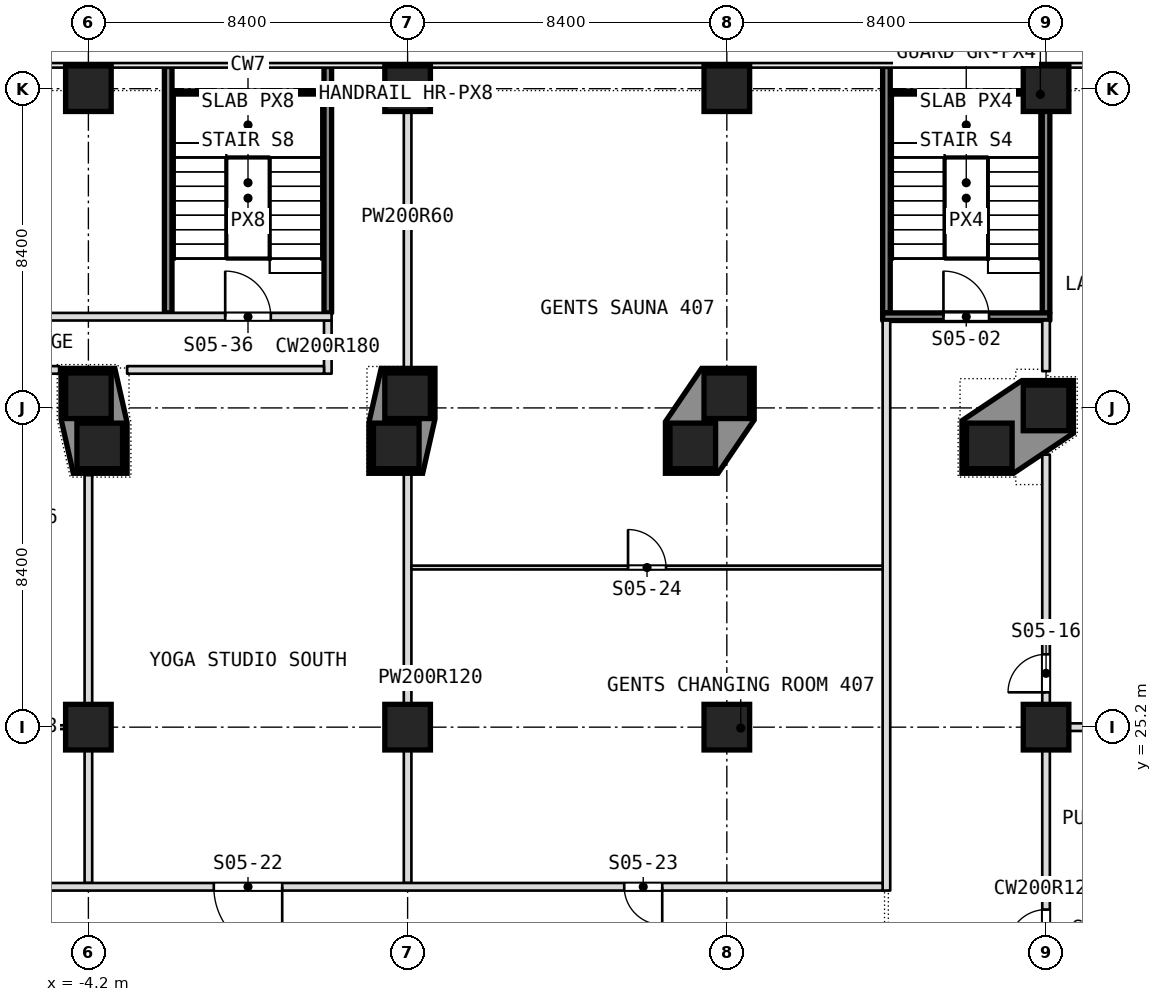
"""IFC4 building model, lengths in metres.
Left out: names, types, materials, properties, quantities, classifications, styles, units other than length and angle.
Written with IfcOpenShell. Run it as: python <this file> out.ifc"""

import sys

from ifc_helpers import new_model, si_unit, direction, frame, frame_2d, origin, origin_2d, place, context, subcontext, project, spatial, polyline, rectangle, outline, extrude, element, fill, save


model = new_model("IFC4")
c1 = context("Model", 3, precision=1e-05, world=origin(), true_north=direction((0.0, 1.0)))
c2 = subcontext(c1, "Body", "Model", "MODEL_VIEW")
j1 = project(units=[si_unit("LENGTHUNIT", "METRE"), si_unit("PLANEANGLEUNIT", "RADIAN")], contexts=[c1])
p1 = place(None, origin())
s1 = spatial("IfcSite", under=j1, at=p1, CompositionType="ELEMENT")
p2 = place(p1, origin())
s2 = spatial("IfcBuilding", under=s1, at=p2, CompositionType="ELEMENT")
p3 = place(p2, frame((0.0, 0.0, 26.0)))
s3 = spatial("IfcBuildingStorey", under=s2, at=p3, CompositionType="ELEMENT", Elevation=26.0)
for number, where, z_axis, x_axis in (
    (1, (-4.2, 25.2, 0.0), (0.0, 0.0, 1.0), (1.0, 0.0, 0.0)),
    (2, (4.2, 25.2, 0.0), (0.0, 0.0, 1.0), (1.0, 0.0, 0.0)),
    (3, (12.6, 25.2, 0.0), (0.0, 0.0, 1.0), (1.0, 0.0, 0.0)),
    (4, (21.0, 25.2, 0.0), (0.0, 0.0, 1.0), (1.0, 0.0, 0.0)),
    (5, (-4.2, 33.92, 0.0), (0.0, 0.0, 1.0), (1.0, 0.0, 0.0)),
    (6, (4.2, 33.92, 0.0), (0.0, 0.0, 1.0), (1.0, 0.0, 0.0)),
    (7, (12.6, 33.92, 0.0), (0.0, 0.0, 1.0), (1.0, 0.0, 0.0)),
    (8, (21.0, 33.6, 0.0), (0.0, 0.0, 1.0), (1.0, 0.0, 0.0)),
    (9, (-4.2, 42.0, 0.0), (0.0, 0.0, 1.0), (1.0, 0.0, 0.0)),
    (10, (4.2, 42.0, 0.0), (0.0, 0.0, 1.0), (1.0, 0.0, 0.0)),
    (11, (12.6, 42.0, 0.0), (0.0, 0.0, 1.0), (1.0, 0.0, 0.0)),
    (12, (21.0, 42.0, 0.0), (0.0, 0.0, 1.0), (1.0, 0.0, 0.0)),
    (13, (-3.901, 32.6, 0.0), (0.0, 0.0, 1.0), (1.0, 0.0, 0.0)),
    (14, (3.901, 32.6, 0.0), (0.0, 0.0, 1.0), (1.0, 0.0, 0.0)),
    (15, (11.704, 32.6, 0.0), (0.0, 0.0, 1.0), (1.0, 0.0, 0.0)),
    (16, (19.507, 32.6, 0.0), (0.0, 0.0, 1.0), (1.0, 0.0, 0.0)),
):
    element("IfcColumn", number, at=place(p3, frame(where, z_axis=z_axis, x_axis=x_axis)), inside=s3, PredefinedType="COLUMN", context=c2, shape_type="SweptSolid", body=[
        extrude(rectangle(XDim=1.2, YDim=1.2, at=origin_2d()), origin(), (0.0, 0.0, 1.0), 5.0),
    ])
p4 = place(p3, frame((21.0, 9.5, 0.0), z_axis=(0.0, 0.0, 1.0), x_axis=(0.0, 1.0, 0.0)))
e17 = element("IfcWall", 17, at=p4, inside=s3, PredefinedType="PARTITIONING", context=c2, shape_type="SweptSolid", body=[
    extrude(rectangle(XDim=22.871, YDim=0.2, at=frame_2d((11.436, 0.0))), origin(), (0.0, 0.0, 1.0), 4.68),
])
p5 = place(p4, frame((9.9, 0.0, 0.0)))
e18 = element("IfcOpeningElement", 18, at=p5, cuts=e17, PredefinedType="OPENING", context=c2, shape_type="SweptSolid", body=[
    extrude(rectangle(XDim=1.0, YDim=2.1, at=frame_2d((0.5, 1.05))), frame((0.0, 0.1, 0.0), z_axis=(0.0, -1.0, 0.0), x_axis=(1.0, 0.0, 0.0)), (0.0, 0.0, 1.0), 0.2),
])
p6 = place(p4, frame((16.617, 0.0, 0.0)))
e19 = element("IfcOpeningElement", 19, at=p6, cuts=e17, PredefinedType="OPENING", context=c2, shape_type="SweptSolid", body=[
    extrude(rectangle(XDim=1.0, YDim=2.1, at=frame_2d((0.5, 1.05))), frame((0.0, 0.1, 0.0), z_axis=(0.0, -1.0, 0.0), x_axis=(1.0, 0.0, 0.0)), (0.0, 0.0, 1.0), 0.2),
])
p7 = place(p3, frame((21.0, 34.567, 0.0), z_axis=(0.0, 0.0, 1.0), x_axis=(0.0, 1.0, 0.0)))
e20 = element("IfcWall", 20, at=p7, inside=s3, PredefinedType="PARTITIONING", context=c2, shape_type="SweptSolid", body=[
    extrude(rectangle(XDim=1.333, YDim=0.2, at=frame_2d((0.667, 0.0))), origin(), (0.0, 0.0, 1.0), 4.68),
])
p8 = place(p3, frame((21.0, 36.1, 0.0), z_axis=(0.0, 0.0, 1.0), x_axis=(0.0, 1.0, 0.0)))
e21 = element("IfcWall", 21, at=p8, inside=s3, PredefinedType="PARTITIONING", context=c2, shape_type="SweptSolid", body=[
    extrude(rectangle(XDim=6.484, YDim=0.2, at=frame_2d((3.242, 0.0))), origin(), (0.0, 0.0, 1.0), 4.68),
])
p9 = place(p3, frame((16.8, 20.9, 0.0), z_axis=(0.0, 0.0, 1.0), x_axis=(0.0, 1.0, 0.0)))
e22 = element("IfcWall", 22, at=p9, inside=s3, PredefinedType="PARTITIONING", context=c2, shape_type="SweptSolid", body=[
    extrude(rectangle(XDim=15.0, YDim=0.2, at=frame_2d((7.5, 0.0))), origin(), (0.0, 0.0, 1.0), 4.68),
])
p10 = place(p3, frame((16.8, 36.1, 0.0), z_axis=(0.0, 0.0, 1.0), x_axis=(0.0, 1.0, 0.0)))
e23 = element("IfcWall", 23, at=p10, inside=s3, PredefinedType="PARTITIONING", context=c2, shape_type="SweptSolid", body=[
    extrude(rectangle(XDim=6.484, YDim=0.2, at=frame_2d((3.242, 0.0))), origin(), (0.0, 0.0, 1.0), 4.68),
])
p11 = place(p3, frame((4.2, 21.1, 0.0), z_axis=(0.0, 0.0, 1.0), x_axis=(0.0, 1.0, 0.0)))
e24 = element("IfcWall", 24, at=p11, inside=s3, PredefinedType="PARTITIONING", context=c2, shape_type="SweptSolid", body=[
    extrude(rectangle(XDim=10.78, YDim=0.2, at=frame_2d((5.39, 0.0))), origin(), (0.0, 0.0, 1.0), 4.68),
])
p12 = place(p3, frame((4.2, 34.64, 0.0), z_axis=(0.0, 0.0, 1.0), x_axis=(0.0, 1.0, 0.0)))
e25 = element("IfcWall", 25, at=p12, inside=s3, PredefinedType="PARTITIONING", context=c2, shape_type="SweptSolid", body=[
    extrude(rectangle(XDim=7.944, YDim=0.2, at=frame_2d((3.972, 0.0))), origin(), (0.0, 0.0, 1.0), 4.68),
])
p13 = place(p3, frame((2.1, 36.1, 0.0), z_axis=(0.0, 0.0, 1.0), x_axis=(0.0, 1.0, 0.0)))
e26 = element("IfcWall", 26, at=p13, inside=s3, PredefinedType="PARTITIONING", context=c2, shape_type="SweptSolid", body=[
    extrude(rectangle(XDim=6.484, YDim=0.2, at=frame_2d((3.242, 0.0))), origin(), (0.0, 0.0, 1.0), 4.68),
])
p14 = place(p3, frame((2.1, 34.5, 0.0), z_axis=(0.0, 0.0, 1.0), x_axis=(0.0, 1.0, 0.0)))
e27 = element("IfcWall", 27, at=p14, inside=s3, PredefinedType="PARTITIONING", context=c2, shape_type="SweptSolid", body=[
    extrude(rectangle(XDim=1.4, YDim=0.2, at=frame_2d((0.7, 0.0))), origin(), (0.0, 0.0, 1.0), 4.68),
])
p15 = place(p3, frame((-2.1, 36.1, 0.0), z_axis=(0.0, 0.0, 1.0), x_axis=(0.0, 1.0, 0.0)))
e28 = element("IfcWall", 28, at=p15, inside=s3, PredefinedType="PARTITIONING", context=c2, shape_type="SweptSolid", body=[
    extrude(rectangle(XDim=6.484, YDim=0.2, at=frame_2d((3.242, 0.0))), origin(), (0.0, 0.0, 1.0), 4.68),
])
p16 = place(p3, frame((-4.2, 21.1, 0.0), z_axis=(0.0, 0.0, 1.0), x_axis=(0.0, 1.0, 0.0)))
e29 = element("IfcWall", 29, at=p16, inside=s3, PredefinedType="PARTITIONING", context=c2, shape_type="SweptSolid", body=[
    extrude(rectangle(XDim=10.73, YDim=0.2, at=frame_2d((5.365, 0.0))), origin(), (0.0, 0.0, 1.0), 4.68),
])
p17 = place(p3, frame((-16.7, 21.0, 0.0), z_axis=(0.0, 0.0, 1.0), x_axis=(1.0, 0.0, 0.0)))
e30 = element("IfcWall", 30, at=p17, inside=s3, PredefinedType="PARTITIONING", context=c2, shape_type="SweptSolid", body=[
    extrude(rectangle(XDim=33.4, YDim=0.2, at=frame_2d((16.7, 0.0))), origin(), (0.0, 0.0, 1.0), 4.68),
])
p18 = place(p17, frame((15.8, 0.0, 0.0)))
e31 = element("IfcOpeningElement", 31, at=p18, cuts=e30, PredefinedType="OPENING", context=c2, shape_type="SweptSolid", body=[
    extrude(rectangle(XDim=1.8, YDim=2.1, at=frame_2d((0.9, 1.05))), frame((0.0, 0.1, 0.0), z_axis=(0.0, -1.0, 0.0), x_axis=(1.0, 0.0, 0.0)), (0.0, 0.0, 1.0), 0.2),
])
p19 = place(p17, frame((26.6, 0.0, 0.0)))
e32 = element("IfcOpeningElement", 32, at=p19, cuts=e30, PredefinedType="OPENING", context=c2, shape_type="SweptSolid", body=[
    extrude(rectangle(XDim=1.0, YDim=2.1, at=frame_2d((0.5, 1.05))), frame((0.0, 0.1, 0.0), z_axis=(0.0, -1.0, 0.0), x_axis=(1.0, 0.0, 0.0)), (0.0, 0.0, 1.0), 0.2),
])
p20 = place(p3, frame((21.1, 25.2, 0.0), z_axis=(0.0, 0.0, 1.0), x_axis=(1.0, 0.0, 0.0)))
e33 = element("IfcWall", 33, at=p20, inside=s3, PredefinedType="PARTITIONING", context=c2, shape_type="SweptSolid", body=[
    extrude(rectangle(XDim=6.765, YDim=0.2, at=frame_2d((3.382, 0.0))), origin(), (0.0, 0.0, 1.0), 4.68),
])
p21 = place(p3, frame((-11.98, 25.2, 0.0), z_axis=(0.0, 0.0, 1.0), x_axis=(1.0, 0.0, 0.0)))
e34 = element("IfcWall", 34, at=p21, inside=s3, PredefinedType="PARTITIONING", context=c2, shape_type="SweptSolid", body=[
    extrude(rectangle(XDim=7.68, YDim=0.1, at=frame_2d((3.84, 0.0))), origin(), (0.0, 0.0, 1.0), 4.68),
])
p22 = place(p21, frame((2.94, 0.0, 0.0)))
e35 = element("IfcOpeningElement", 35, at=p22, cuts=e34, PredefinedType="OPENING", context=c2, shape_type="SweptSolid", body=[
    extrude(rectangle(XDim=1.8, YDim=2.1, at=frame_2d((0.9, 1.05))), frame((0.0, 0.05, 0.0), z_axis=(0.0, -1.0, 0.0), x_axis=(1.0, 0.0, 0.0)), (0.0, 0.0, 1.0), 0.1),
])
p23 = place(p3, frame((4.3, 29.4, 0.0), z_axis=(0.0, 0.0, 1.0), x_axis=(1.0, 0.0, 0.0)))
e36 = element("IfcWall", 36, at=p23, inside=s3, PredefinedType="PARTITIONING", context=c2, shape_type="SweptSolid", body=[
    extrude(rectangle(XDim=12.4, YDim=0.1, at=frame_2d((6.2, 0.0))), origin(), (0.0, 0.0, 1.0), 4.68),
])
p24 = place(p23, frame((5.7, 0.0, 0.0)))
e37 = element("IfcOpeningElement", 37, at=p24, cuts=e36, PredefinedType="OPENING", context=c2, shape_type="SweptSolid", body=[
    extrude(rectangle(XDim=1.0, YDim=2.1, at=frame_2d((0.5, 1.05))), frame((0.0, 0.05, 0.0), z_axis=(0.0, -1.0, 0.0), x_axis=(1.0, 0.0, 0.0)), (0.0, 0.0, 1.0), 0.1),
])
p25 = place(p3, frame((-10.984, 34.6, 0.0), z_axis=(0.0, 0.0, 1.0), x_axis=(1.0, 0.0, 0.0)))
e38 = element("IfcWall", 38, at=p25, inside=s3, PredefinedType="PARTITIONING", context=c2, shape_type="SweptSolid", body=[
    extrude(rectangle(XDim=6.014, YDim=0.2, at=frame_2d((3.007, 0.0))), origin(), (0.0, 0.0, 1.0), 4.68),
])
p26 = place(p3, frame((-3.181, 34.6, 0.0), z_axis=(0.0, 0.0, 1.0), x_axis=(1.0, 0.0, 0.0)))
e39 = element("IfcWall", 39, at=p26, inside=s3, PredefinedType="PARTITIONING", context=c2, shape_type="SweptSolid", body=[
    extrude(rectangle(XDim=5.181, YDim=0.2, at=frame_2d((2.59, 0.0))), origin(), (0.0, 0.0, 1.0), 4.68),
])
p27 = place(p3, frame((-21.1, 36.0, 0.0), z_axis=(0.0, 0.0, 1.0), x_axis=(1.0, 0.0, 0.0)))
e40 = element("IfcWall", 40, at=p27, inside=s3, PredefinedType="PARTITIONING", context=c2, shape_type="SweptSolid", body=[
    extrude(rectangle(XDim=23.3, YDim=0.2, at=frame_2d((11.65, 0.0))), origin(), (0.0, 0.0, 1.0), 4.68),
])
p28 = place(p27, frame((1.6, 0.0, 0.0)))
e41 = element("IfcOpeningElement", 41, at=p28, cuts=e40, PredefinedType="OPENING", context=c2, shape_type="SweptSolid", body=[
    extrude(rectangle(XDim=1.2, YDim=2.1, at=frame_2d((0.6, 1.05))), frame((0.0, 0.1, 0.0), z_axis=(0.0, -1.0, 0.0), x_axis=(1.0, 0.0, 0.0)), (0.0, 0.0, 1.0), 0.2),
])
p29 = place(p27, frame((11.15, 0.0, 0.0)))
e42 = element("IfcOpeningElement", 42, at=p29, cuts=e40, PredefinedType="OPENING", context=c2, shape_type="SweptSolid", body=[
    extrude(rectangle(XDim=1.0, YDim=2.1, at=frame_2d((0.5, 1.05))), frame((0.0, 0.1, 0.0), z_axis=(0.0, -1.0, 0.0), x_axis=(1.0, 0.0, 0.0)), (0.0, 0.0, 1.0), 0.2),
])
p30 = place(p27, frame((10.05, 0.0, 0.0)))
e43 = element("IfcOpeningElement", 43, at=p30, cuts=e40, PredefinedType="OPENING", context=c2, shape_type="SweptSolid", body=[
    extrude(rectangle(XDim=1.0, YDim=2.1, at=frame_2d((0.5, 1.05))), frame((0.0, 0.1, 0.0), z_axis=(0.0, -1.0, 0.0), x_axis=(1.0, 0.0, 0.0)), (0.0, 0.0, 1.0), 0.2),
])
p31 = place(p27, frame((20.5, 0.0, 0.0)))
e44 = element("IfcOpeningElement", 44, at=p31, cuts=e40, PredefinedType="OPENING", context=c2, shape_type="SweptSolid", body=[
    extrude(rectangle(XDim=1.2, YDim=2.1, at=frame_2d((0.6, 1.05))), frame((0.0, 0.1, 0.0), z_axis=(0.0, -1.0, 0.0), x_axis=(1.0, 0.0, 0.0)), (0.0, 0.0, 1.0), 0.2),
])
p32 = place(p3, frame((16.7, 36.0, 0.0), z_axis=(0.0, 0.0, 1.0), x_axis=(1.0, 0.0, 0.0)))
e45 = element("IfcWall", 45, at=p32, inside=s3, PredefinedType="PARTITIONING", context=c2, shape_type="SweptSolid", body=[
    extrude(rectangle(XDim=4.4, YDim=0.2, at=frame_2d((2.2, 0.0))), origin(), (0.0, 0.0, 1.0), 4.68),
])
p33 = place(p32, frame((1.6, 0.0, 0.0)))
e46 = element("IfcOpeningElement", 46, at=p33, cuts=e45, PredefinedType="OPENING", context=c2, shape_type="SweptSolid", body=[
    extrude(rectangle(XDim=1.2, YDim=2.1, at=frame_2d((0.6, 1.05))), frame((0.0, 0.1, 0.0), z_axis=(0.0, -1.0, 0.0), x_axis=(1.0, 0.0, 0.0)), (0.0, 0.0, 1.0), 0.2),
])
p34 = place(p3, origin())
e47 = element("IfcWall", 47, at=p34, inside=s3, PredefinedType="SOLIDWALL", context=c2, shape_type="SweptSolid", body=[
    extrude(outline(polyline([(-4.92, 33.307), (-4.92, 34.64), (-3.504, 34.64), (-3.181, 33.213), (-3.181, 31.88), (-4.597, 31.88), (-4.92, 33.307)]), holes=[polyline([(-4.501, 32.0), (-3.302, 32.0), (-3.302, 33.2), (-4.501, 33.2), (-4.501, 32.0)]), polyline([(-4.8, 33.32), (-3.6, 33.32), (-3.6, 34.52), (-4.8, 34.52), (-4.8, 33.32)])]), origin(), (0.0, 0.0, 1.0), 5.0),
])
p35 = place(p3, origin())
e48 = element("IfcWall", 48, at=p35, inside=s3, PredefinedType="SOLIDWALL", context=c2, shape_type="SweptSolid", body=[
    extrude(outline(polyline([(3.181, 33.213), (3.504, 34.64), (4.92, 34.64), (4.92, 33.307), (4.597, 31.88), (3.181, 31.88), (3.181, 33.213)]), holes=[polyline([(3.6, 33.32), (4.8, 33.32), (4.8, 34.52), (3.6, 34.52), (3.6, 33.32)]), polyline([(3.302, 32.0), (4.501, 32.0), (4.501, 33.2), (3.302, 33.2), (3.302, 32.0)])]), origin(), (0.0, 0.0, 1.0), 5.0),
])
p36 = place(p3, origin())
e49 = element("IfcWall", 49, at=p36, inside=s3, PredefinedType="SOLIDWALL", context=c2, shape_type="SweptSolid", body=[
    extrude(outline(polyline([(11.937, 34.64), (13.32, 34.64), (13.32, 33.283), (12.368, 31.88), (10.984, 31.88), (10.984, 33.237), (11.937, 34.64)]), holes=[polyline([(13.2, 33.32), (13.2, 34.52), (12.0, 34.52), (12.0, 33.32), (13.2, 33.32)]), polyline([(12.304, 32.0), (12.304, 33.2), (11.104, 33.2), (11.104, 32.0), (12.304, 32.0)])]), origin(), (0.0, 0.0, 1.0), 5.0),
])
p37 = place(p3, origin())
e50 = element("IfcWall", 50, at=p37, inside=s3, PredefinedType="SOLIDWALL", context=c2, shape_type="SweptSolid", body=[
    extrude(outline(polyline([(20.364, 34.32), (21.72, 34.32), (21.72, 32.936), (20.143, 31.88), (18.787, 31.88), (18.787, 33.264), (20.364, 34.32)]), holes=[polyline([(21.6, 33.0), (21.6, 34.2), (20.4, 34.2), (20.4, 33.0), (21.6, 33.0)]), polyline([(20.107, 32.0), (20.107, 33.2), (18.907, 33.2), (18.907, 32.0), (20.107, 32.0)])]), origin(), (0.0, 0.0, 1.0), 5.0),
])
p38 = place(p33, origin())
e51 = element("IfcDoor", 51, at=p38, inside=s3, OperationType="SINGLE_SWING_LEFT", PredefinedType="DOOR", context=c2, shape_type="SweptSolid", body=[
    extrude(rectangle(XDim=1.2, YDim=2.1, at=frame_2d((0.6, 1.05))), frame((0.0, 0.025, 0.0), z_axis=(0.0, -1.0, 0.0), x_axis=(1.0, 0.0, 0.0)), (0.0, 0.0, 1.0), 0.05),
])
fill(e46, e51)
p39 = place(p5, origin())
e52 = element("IfcDoor", 52, at=p39, inside=s3, OperationType="SINGLE_SWING_RIGHT", PredefinedType="DOOR", context=c2, shape_type="SweptSolid", body=[
    extrude(rectangle(XDim=1.0, YDim=2.1, at=frame_2d((0.5, 1.05))), frame((0.0, 0.025, 0.0), z_axis=(0.0, -1.0, 0.0), x_axis=(1.0, 0.0, 0.0)), (0.0, 0.0, 1.0), 0.05),
])
fill(e18, e52)
p40 = place(p6, origin())
e53 = element("IfcDoor", 53, at=p40, inside=s3, OperationType="SINGLE_SWING_RIGHT", PredefinedType="DOOR", context=c2, shape_type="SweptSolid", body=[
    extrude(rectangle(XDim=1.0, YDim=2.1, at=frame_2d((0.5, 1.05))), frame((0.0, 0.025, 0.0), z_axis=(0.0, -1.0, 0.0), x_axis=(1.0, 0.0, 0.0)), (0.0, 0.0, 1.0), 0.05),
])
fill(e19, e53)
p41 = place(p18, origin())
e54 = element("IfcDoor", 54, at=p41, inside=s3, OperationType="DOUBLE_DOOR_SINGLE_SWING", PredefinedType="DOOR", context=c2, shape_type="SweptSolid", body=[
    extrude(rectangle(XDim=1.8, YDim=2.1, at=frame_2d((0.9, 1.05))), frame((0.0, 0.025, 0.0), z_axis=(0.0, -1.0, 0.0), x_axis=(1.0, 0.0, 0.0)), (0.0, 0.0, 1.0), 0.05),
])
fill(e31, e54)
p42 = place(p19, origin())
e55 = element("IfcDoor", 55, at=p42, inside=s3, OperationType="SINGLE_SWING_RIGHT", PredefinedType="DOOR", context=c2, shape_type="SweptSolid", body=[
    extrude(rectangle(XDim=1.0, YDim=2.1, at=frame_2d((0.5, 1.05))), frame((0.0, 0.025, 0.0), z_axis=(0.0, -1.0, 0.0), x_axis=(1.0, 0.0, 0.0)), (0.0, 0.0, 1.0), 0.05),
])
fill(e32, e55)
p43 = place(p24, origin())
e56 = element("IfcDoor", 56, at=p43, inside=s3, OperationType="SINGLE_SWING_RIGHT", PredefinedType="DOOR", context=c2, shape_type="SweptSolid", body=[
    extrude(rectangle(XDim=1.0, YDim=2.1, at=frame_2d((0.5, 1.05))), frame((0.0, 0.025, 0.0), z_axis=(0.0, -1.0, 0.0), x_axis=(1.0, 0.0, 0.0)), (0.0, 0.0, 1.0), 0.05),
])
fill(e37, e56)
p44 = place(p31, origin())
e57 = element("IfcDoor", 57, at=p44, inside=s3, OperationType="SINGLE_SWING_RIGHT", PredefinedType="DOOR", context=c2, shape_type="SweptSolid", body=[
    extrude(rectangle(XDim=1.2, YDim=2.1, at=frame_2d((0.6, 1.05))), frame((0.0, 0.025, 0.0), z_axis=(0.0, -1.0, 0.0), x_axis=(1.0, 0.0, 0.0)), (0.0, 0.0, 1.0), 0.05),
])
fill(e44, e57)
save(model, sys.argv[1])
